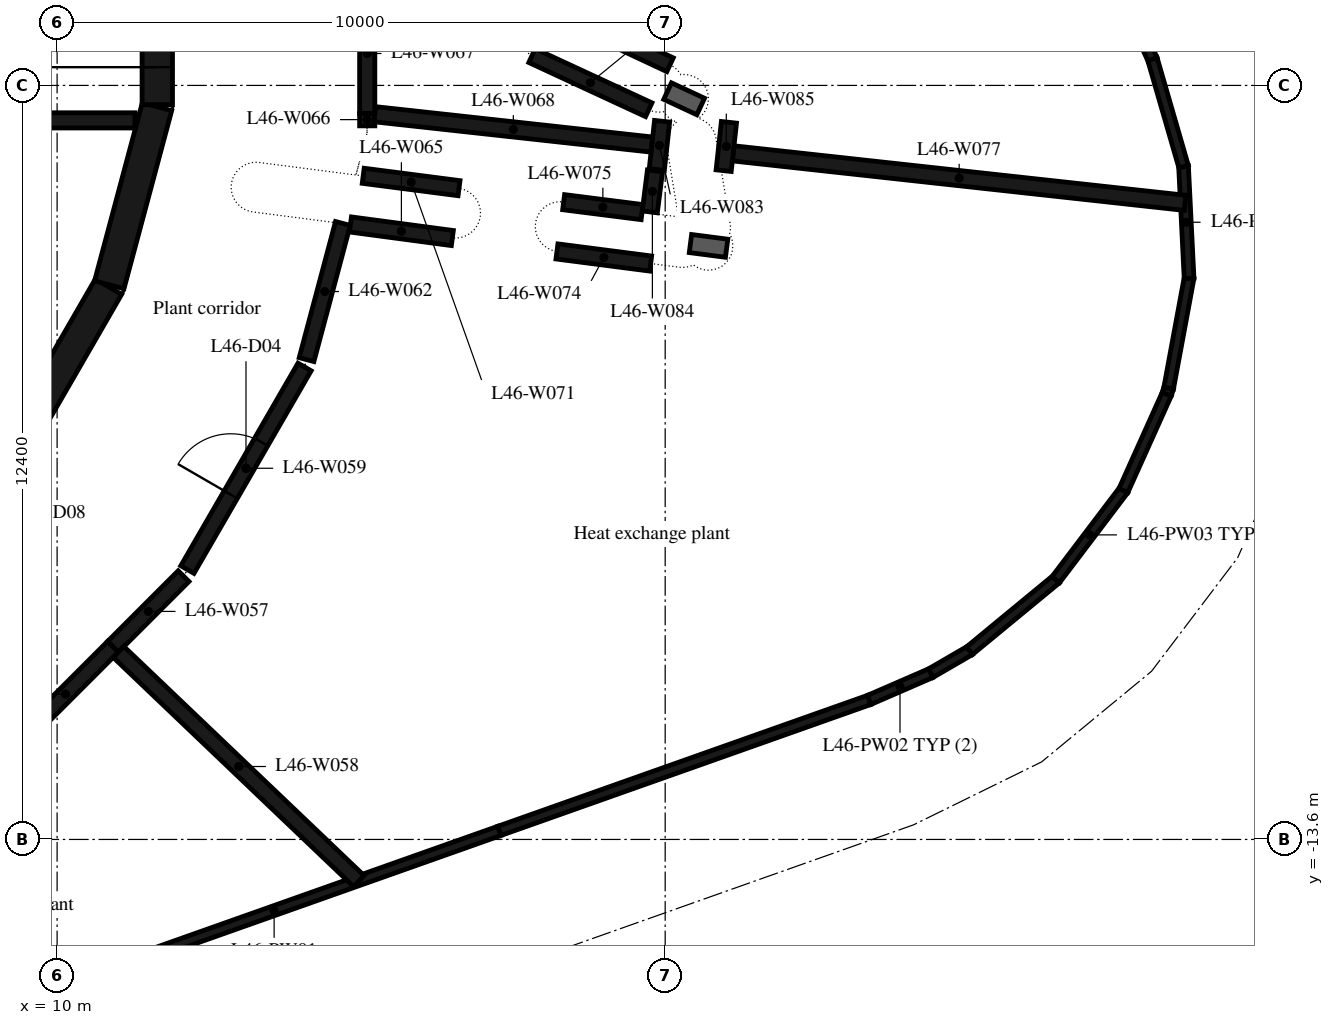
"""IFC4 building model, lengths in metres.
Left out: names, types, materials, properties, quantities, classifications, styles, units other than length and angle.
Written with IfcOpenShell. Run it as: python <this file> out.ifc"""

import sys

from ifc_helpers import new_model, si_unit, direction, frame, frame_2d, origin, place, context, subcontext, project, spatial, rectangle, extrude, element, fill, save


model = new_model("IFC4")
c1 = context("Model", 3, precision=1e-05, world=origin(), true_north=direction((0.0, 1.0)))
c2 = subcontext(c1, "Body", "Model", "MODEL_VIEW")
j1 = project(units=[si_unit("LENGTHUNIT", "METRE"), si_unit("PLANEANGLEUNIT", "RADIAN")], contexts=[c1])
p1 = place(None, origin())
s1 = spatial("IfcSite", under=j1, at=p1, CompositionType="ELEMENT")
p2 = place(p1, origin())
s2 = spatial("IfcBuilding", under=s1, at=p2, CompositionType="ELEMENT")
p3 = place(p2, frame((0.0, 0.0, 183.2)))
s3 = spatial("IfcBuildingStorey", under=s2, at=p3, CompositionType="ELEMENT", Elevation=183.2)
p4 = place(p3, frame((9.864, -16.083, 0.0), z_axis=(0.0, 0.0, 1.0), x_axis=(0.942652676872, 0.333775269883, 0.0)))
e1 = element("IfcWall", 1, at=p4, inside=s3, PredefinedType="STANDARD", context=c2, shape_type="SweptSolid", body=[
    extrude(rectangle(XDim=7.86, YDim=0.16, at=frame_2d((3.93, 0.0))), origin(), (0.0, 0.0, 1.0), 4.75),
])
p5 = place(p3, frame((17.274, -13.459, 0.0), z_axis=(0.0, 0.0, 1.0), x_axis=(0.942633672314, 0.33382893796, 0.0)))
e2 = element("IfcWall", 2, at=p5, inside=s3, PredefinedType="STANDARD", context=c2, shape_type="SweptSolid", body=[
    extrude(rectangle(XDim=6.455, YDim=0.16, at=frame_2d((3.228, 0.0))), origin(), (0.0, 0.0, 1.0), 4.75),
])
p6 = place(p3, frame((23.356, -11.305, 0.0), z_axis=(0.0, 0.0, 1.0), x_axis=(0.917165011086, 0.398507644141, 0.0)))
e3 = element("IfcWall", 3, at=p6, inside=s3, PredefinedType="STANDARD", context=c2, shape_type="SweptSolid", body=[
    extrude(rectangle(XDim=1.103, YDim=0.16, at=frame_2d((0.552, 0.0))), origin(), (0.0, 0.0, 1.0), 4.75),
])
p7 = place(p3, frame((24.368, -10.865, 0.0), z_axis=(0.0, 0.0, 1.0), x_axis=(0.864683082899, 0.502317793979, 0.0)))
e4 = element("IfcWall", 4, at=p7, inside=s3, PredefinedType="STANDARD", context=c2, shape_type="SweptSolid", body=[
    extrude(rectangle(XDim=0.743, YDim=0.16, at=frame_2d((0.372, 0.0))), origin(), (0.0, 0.0, 1.0), 4.75),
])
p8 = place(p3, frame((25.005, -10.496, 0.0), z_axis=(0.0, 0.0, 1.0), x_axis=(0.771601970695, 0.636105650674, 0.0)))
e5 = element("IfcWall", 5, at=p8, inside=s3, PredefinedType="STANDARD", context=c2, shape_type="SweptSolid", body=[
    extrude(rectangle(XDim=1.847, YDim=0.16, at=frame_2d((0.923, 0.0))), origin(), (0.0, 0.0, 1.0), 4.75),
])
p9 = place(p3, frame((26.424, -9.328, 0.0), z_axis=(0.0, 0.0, 1.0), x_axis=(0.604071299834, 0.796930275945, 0.0)))
e6 = element("IfcWall", 6, at=p9, inside=s3, PredefinedType="STANDARD", context=c2, shape_type="SweptSolid", body=[
    extrude(rectangle(XDim=1.848, YDim=0.16, at=frame_2d((0.924, 0.0))), origin(), (0.0, 0.0, 1.0), 4.75),
])
p10 = place(p3, frame((27.535, -7.863, 0.0), z_axis=(0.0, 0.0, 1.0), x_axis=(0.410096035118, 0.912042346594, 0.0)))
e7 = element("IfcWall", 7, at=p10, inside=s3, PredefinedType="STANDARD", context=c2, shape_type="SweptSolid", body=[
    extrude(rectangle(XDim=1.738, YDim=0.16, at=frame_2d((0.869, 0.0))), origin(), (0.0, 0.0, 1.0), 4.75),
])
p11 = place(p3, frame((28.248, -6.277, 0.0), z_axis=(0.0, 0.0, 1.0), x_axis=(0.302644266981, 0.953103587058, 0.0)))
e8 = element("IfcWall", 8, at=p11, inside=s3, PredefinedType="STANDARD", context=c2, shape_type="SweptSolid", body=[
    extrude(rectangle(XDim=0.108, YDim=0.16, at=frame_2d((0.054, 0.0))), origin(), (0.0, 0.0, 1.0), 4.75),
])
p12 = place(p3, frame((28.28, -6.179, 0.0), z_axis=(0.0, 0.0, 1.0), x_axis=(0.182236062602, 0.983254808016, 0.0)))
e9 = element("IfcWall", 9, at=p12, inside=s3, PredefinedType="STANDARD", context=c2, shape_type="SweptSolid", body=[
    extrude(rectangle(XDim=1.846, YDim=0.16, at=frame_2d((0.923, 0.0))), origin(), (0.0, 0.0, 1.0), 4.75),
])
p13 = place(p3, frame((28.615, -4.373, 0.0), z_axis=(0.0, 0.0, 1.0), x_axis=(-0.049272179595, 0.998785388518, 0.0)))
e10 = element("IfcWall", 10, at=p13, inside=s3, PredefinedType="STANDARD", context=c2, shape_type="SweptSolid", body=[
    extrude(rectangle(XDim=1.848, YDim=0.16, at=frame_2d((0.924, 0.0))), origin(), (0.0, 0.0, 1.0), 4.75),
])
p14 = place(p3, frame((28.526, -2.536, 0.0), z_axis=(0.0, 0.0, 1.0), x_axis=(-0.278420792997, 0.960459193317, 0.0)))
e11 = element("IfcWall", 11, at=p14, inside=s3, PredefinedType="STANDARD", context=c2, shape_type="SweptSolid", body=[
    extrude(rectangle(XDim=1.847, YDim=0.16, at=frame_2d((0.923, 0.0))), origin(), (0.0, 0.0, 1.0), 4.75),
])
p15 = place(p3, frame((28.014, -0.768, 0.0), z_axis=(0.0, 0.0, 1.0), x_axis=(-0.418883410895, 0.908040025592, 0.0)))
e12 = element("IfcWall", 12, at=p15, inside=s3, PredefinedType="STANDARD", context=c2, shape_type="SweptSolid", body=[
    extrude(rectangle(XDim=0.531, YDim=0.16, at=frame_2d((0.266, 0.0))), origin(), (0.0, 0.0, 1.0), 4.75),
])
for number, where, z_axis, x_axis in (
    (13, (9.329, -7.137, 0.0), (0.0, 0.0, 1.0), (0.5, 0.866, 0.0)),
    (14, (10.858, -4.479, 0.0), (0.0, 0.0, 1.0), (0.259, 0.966, 0.0)),
):
    element("IfcWall", number, at=place(p3, frame(where, z_axis=z_axis, x_axis=x_axis)), inside=s3, PredefinedType="SHEAR", context=c2, shape_type="SweptSolid", body=[
        extrude(rectangle(XDim=3.033, YDim=0.5, at=frame_2d((1.516, 0.0))), origin(), (0.0, 0.0, 1.0), 4.75),
    ])
p16 = place(p3, frame((11.647, -1.516, 0.0), z_axis=(0.0, 0.0, 1.0), x_axis=(0.0, 1.0, 0.0)))
e15 = element("IfcWall", 15, at=p16, inside=s3, PredefinedType="SHEAR", context=c2, shape_type="SweptSolid", body=[
    extrude(rectangle(XDim=3.033, YDim=0.5, at=frame_2d((1.516, 0.0))), origin(), (0.0, 0.0, 1.0), 4.75),
])
p17 = place(p16, frame((0.616, 0.0, 0.0)))
e16 = element("IfcOpeningElement", 16, at=p17, cuts=e15, PredefinedType="OPENING", context=c2, shape_type="SweptSolid", body=[
    extrude(rectangle(XDim=1.8, YDim=2.1, at=frame_2d((0.9, 1.05))), frame((0.0, 0.26, 0.0), z_axis=(0.0, -1.0, 0.0), x_axis=(1.0, 0.0, 0.0)), (0.0, 0.0, 1.0), 0.52),
])
p18 = place(p3, frame((3.35, -1.775, 0.0), z_axis=(0.0, 0.0, 1.0), x_axis=(1.0, 0.0, 0.0)))
e17 = element("IfcWall", 17, at=p18, inside=s3, PredefinedType="SHEAR", context=c2, shape_type="SweptSolid", body=[
    extrude(rectangle(XDim=7.93, YDim=0.25, at=frame_2d((3.965, 0.0))), origin(), (0.0, 0.0, 1.0), 4.75),
])
p19 = place(p18, frame((0.4, 0.0, 0.0)))
e18 = element("IfcOpeningElement", 18, at=p19, cuts=e17, PredefinedType="OPENING", context=c2, shape_type="SweptSolid", body=[
    extrude(rectangle(XDim=1.1, YDim=2.4, at=frame_2d((0.55, 1.2))), frame((0.0, 0.135, 0.0), z_axis=(0.0, -1.0, 0.0), x_axis=(1.0, 0.0, 0.0)), (0.0, 0.0, 1.0), 0.27),
])
p20 = place(p18, frame((2.55, 0.0, 0.0)))
e19 = element("IfcOpeningElement", 19, at=p20, cuts=e17, PredefinedType="OPENING", context=c2, shape_type="SweptSolid", body=[
    extrude(rectangle(XDim=1.1, YDim=2.4, at=frame_2d((0.55, 1.2))), frame((0.0, 0.135, 0.0), z_axis=(0.0, -1.0, 0.0), x_axis=(1.0, 0.0, 0.0)), (0.0, 0.0, 1.0), 0.27),
])
p21 = place(p18, frame((4.7, 0.0, 0.0)))
e20 = element("IfcOpeningElement", 20, at=p21, cuts=e17, PredefinedType="OPENING", context=c2, shape_type="SweptSolid", body=[
    extrude(rectangle(XDim=1.1, YDim=2.4, at=frame_2d((0.55, 1.2))), frame((0.0, 0.135, 0.0), z_axis=(0.0, -1.0, 0.0), x_axis=(1.0, 0.0, 0.0)), (0.0, 0.0, 1.0), 0.27),
])
p22 = place(p3, frame((9.358, -11.992, 0.0), z_axis=(0.0, 0.0, 1.0), x_axis=(0.707051506082, 0.707162051971, 0.0)))
e21 = element("IfcWall", 21, at=p22, inside=s3, PredefinedType="PARTITIONING", context=c2, shape_type="SweptSolid", body=[
    extrude(rectangle(XDim=2.208, YDim=0.25, at=frame_2d((1.104, 0.0))), origin(), (0.0, 0.0, 1.0), 4.75),
])
p23 = place(p3, frame((10.92, -10.43, 0.0), z_axis=(0.0, 0.0, 1.0), x_axis=(0.707181186066, 0.707032368477, 0.0)))
e22 = element("IfcWall", 22, at=p23, inside=s3, PredefinedType="PARTITIONING", context=c2, shape_type="SweptSolid", body=[
    extrude(rectangle(XDim=1.641, YDim=0.25, at=frame_2d((0.82, 0.0))), origin(), (0.0, 0.0, 1.0), 4.75),
])
p24 = place(p3, frame((11.01, -10.516, 0.0), z_axis=(0.0, 0.0, 1.0), x_axis=(0.723696518253, -0.690118359029, 0.0)))
e23 = element("IfcWall", 23, at=p24, inside=s3, PredefinedType="PARTITIONING", context=c2, shape_type="SweptSolid", body=[
    extrude(rectangle(XDim=5.46, YDim=0.25, at=frame_2d((2.73, 0.0))), origin(), (0.0, 0.0, 1.0), 4.75),
])
p25 = place(p3, frame((12.143, -9.162, 0.0), z_axis=(0.0, 0.0, 1.0), x_axis=(0.500756218026, 0.865588360659, 0.0)))
e24 = element("IfcWall", 24, at=p25, inside=s3, PredefinedType="PARTITIONING", context=c2, shape_type="SweptSolid", body=[
    extrude(rectangle(XDim=3.849, YDim=0.25, at=frame_2d((1.925, 0.0))), origin(), (0.0, 0.0, 1.0), 4.75),
])
p26 = place(p25, frame((1.425, 0.0, 0.0)))
e25 = element("IfcOpeningElement", 25, at=p26, cuts=e24, PredefinedType="OPENING", context=c2, shape_type="SweptSolid", body=[
    extrude(rectangle(XDim=1.0, YDim=2.1, at=frame_2d((0.5, 1.05))), frame((0.0, 0.135, 0.0), z_axis=(0.0, -1.0, 0.0), x_axis=(1.0, 0.0, 0.0)), (0.0, 0.0, 1.0), 0.27),
])
p27 = place(p3, frame((14.102, -5.709, 0.0), z_axis=(0.0, 0.0, 1.0), x_axis=(0.257872450401, 0.966178968579, 0.0)))
e26 = element("IfcWall", 26, at=p27, inside=s3, PredefinedType="PARTITIONING", context=c2, shape_type="SweptSolid", body=[
    extrude(rectangle(XDim=2.318, YDim=0.25, at=frame_2d((1.159, 0.0))), origin(), (0.0, 0.0, 1.0), 4.75),
])
p28 = place(p3, frame((14.824, -3.487, 0.0), z_axis=(0.0, 0.0, 1.0), x_axis=(0.991234204775, -0.132116430789, 0.0)))
e27 = element("IfcWall", 27, at=p28, inside=s3, PredefinedType="PARTITIONING", context=c2, shape_type="SweptSolid", body=[
    extrude(rectangle(XDim=1.691, YDim=0.25, at=frame_2d((0.845, 0.0))), origin(), (0.0, 0.0, 1.0), 4.75),
])
p29 = place(p3, frame((15.1, -1.865, 0.0), z_axis=(0.0, 0.0, 1.0), x_axis=(0.0, 1.0, 0.0)))
e28 = element("IfcWall", 28, at=p29, inside=s3, PredefinedType="PARTITIONING", context=c2, shape_type="SweptSolid", body=[
    extrude(rectangle(XDim=0.205, YDim=0.25, at=frame_2d((0.103, 0.0))), origin(), (0.0, 0.0, 1.0), 4.75),
])
p30 = place(p3, frame((15.1, -1.66, 0.0), z_axis=(0.0, 0.0, 1.0), x_axis=(0.0, 1.0, 0.0)))
e29 = element("IfcWall", 29, at=p30, inside=s3, PredefinedType="PARTITIONING", context=c2, shape_type="SweptSolid", body=[
    extrude(rectangle(XDim=1.97, YDim=0.25, at=frame_2d((0.985, 0.0))), origin(), (0.0, 0.0, 1.0), 4.75),
])
p31 = place(p3, frame((15.224, -1.674, 0.0), z_axis=(0.0, 0.0, 1.0), x_axis=(0.994052069643, -0.10890584391, 0.0)))
e30 = element("IfcWall", 30, at=p31, inside=s3, PredefinedType="PARTITIONING", context=c2, shape_type="SweptSolid", body=[
    extrude(rectangle(XDim=4.584, YDim=0.25, at=frame_2d((2.292, 0.0))), origin(), (0.0, 0.0, 1.0), 4.75),
])
p32 = place(p3, frame((16.61, -2.89, 0.0), z_axis=(0.0, 0.0, 1.0), x_axis=(-0.991739457585, 0.128268656611, 0.0)))
e31 = element("IfcWall", 31, at=p32, inside=s3, PredefinedType="PARTITIONING", context=c2, shape_type="SweptSolid", body=[
    extrude(rectangle(XDim=1.589, YDim=0.25, at=frame_2d((0.795, 0.0))), origin(), (0.0, 0.0, 1.0), 4.75),
])
p33 = place(p3, frame((17.81, -0.71, 0.0), z_axis=(0.0, 0.0, 1.0), x_axis=(0.907235451834, -0.420623150736, 0.0)))
e32 = element("IfcWall", 32, at=p33, inside=s3, PredefinedType="PARTITIONING", context=c2, shape_type="SweptSolid", body=[
    extrude(rectangle(XDim=2.116, YDim=0.25, at=frame_2d((1.058, 0.0))), origin(), (0.0, 0.0, 1.0), 4.75),
])
p34 = place(p3, frame((18.22, -3.93, 0.0), z_axis=(0.0, 0.0, 1.0), x_axis=(0.991732145858, -0.128325176301, 0.0)))
e33 = element("IfcWall", 33, at=p34, inside=s3, PredefinedType="PARTITIONING", context=c2, shape_type="SweptSolid", body=[
    extrude(rectangle(XDim=1.554, YDim=0.25, at=frame_2d((0.777, 0.0))), origin(), (0.0, 0.0, 1.0), 4.75),
])
p35 = place(p3, frame((19.62, -3.284, 0.0), z_axis=(0.0, 0.0, 1.0), x_axis=(-0.992059772681, 0.125767274872, 0.0)))
e34 = element("IfcWall", 34, at=p35, inside=s3, PredefinedType="PARTITIONING", context=c2, shape_type="SweptSolid", body=[
    extrude(rectangle(XDim=1.301, YDim=0.25, at=frame_2d((0.65, 0.0))), origin(), (0.0, 0.0, 1.0), 4.75),
])
p36 = place(p3, frame((20.08, -0.86, 0.0), z_axis=(0.0, 0.0, 1.0), x_axis=(-0.905446492275, 0.424460421744, 0.0)))
e35 = element("IfcWall", 35, at=p36, inside=s3, PredefinedType="PARTITIONING", context=c2, shape_type="SweptSolid", body=[
    extrude(rectangle(XDim=2.121, YDim=0.25, at=frame_2d((1.06, 0.0))), origin(), (0.0, 0.0, 1.0), 4.75),
])
p37 = place(p3, frame((21.118, -2.317, 0.0), z_axis=(0.0, 0.0, 1.0), x_axis=(0.994052596122, -0.108901038305, 0.0)))
e36 = element("IfcWall", 36, at=p37, inside=s3, PredefinedType="PARTITIONING", context=c2, shape_type="SweptSolid", body=[
    extrude(rectangle(XDim=7.477, YDim=0.25, at=frame_2d((3.738, 0.0))), origin(), (0.0, 0.0, 1.0), 4.75),
])
p38 = place(p3, frame((19.862, -2.584, 0.0), z_axis=(0.0, 0.0, 1.0), x_axis=(0.108655902306, 0.994079420818, 0.0)))
e37 = element("IfcWall", 37, at=p38, inside=s3, PredefinedType="PARTITIONING", context=c2, shape_type="SweptSolid", body=[
    extrude(rectangle(XDim=0.8, YDim=0.25, at=frame_2d((0.4, 0.0))), origin(), (0.0, 0.0, 1.0), 4.75),
])
p39 = place(p3, frame((19.747, -3.28, 0.0), z_axis=(0.0, 0.0, 1.0), x_axis=(0.125978143653, 0.992033017254, 0.0)))
e38 = element("IfcWall", 38, at=p39, inside=s3, PredefinedType="PARTITIONING", context=c2, shape_type="SweptSolid", body=[
    extrude(rectangle(XDim=0.68, YDim=0.25, at=frame_2d((0.34, 0.0))), origin(), (0.0, 0.0, 1.0), 4.75),
])
p40 = place(p3, frame((21.049, -1.807, 0.0), z_axis=(0.0, 0.0, 1.0), x_axis=(-0.108655902306, -0.994079420818, 0.0)))
e39 = element("IfcWall", 39, at=p40, inside=s3, PredefinedType="PARTITIONING", context=c2, shape_type="SweptSolid", body=[
    extrude(rectangle(XDim=0.8, YDim=0.25, at=frame_2d((0.4, 0.0))), origin(), (0.0, 0.0, 1.0), 4.75),
])
p41 = place(p17, origin())
e40 = element("IfcDoor", 40, at=p41, inside=s3, OperationType="DOUBLE_DOOR_SINGLE_SWING", PredefinedType="DOOR", context=c2, shape_type="SweptSolid", body=[
    extrude(rectangle(XDim=1.8, YDim=2.1, at=frame_2d((0.9, 1.05))), frame((0.0, 0.025, 0.0), z_axis=(0.0, -1.0, 0.0), x_axis=(1.0, 0.0, 0.0)), (0.0, 0.0, 1.0), 0.05),
])
fill(e16, e40)
p42 = place(p26, origin())
e41 = element("IfcDoor", 41, at=p42, inside=s3, OperationType="SINGLE_SWING_LEFT", PredefinedType="DOOR", context=c2, shape_type="SweptSolid", body=[
    extrude(rectangle(XDim=1.0, YDim=2.1, at=frame_2d((0.5, 1.05))), frame((0.0, 0.025, 0.0), z_axis=(0.0, -1.0, 0.0), x_axis=(1.0, 0.0, 0.0)), (0.0, 0.0, 1.0), 0.05),
])
fill(e25, e41)
save(model, sys.argv[1])
